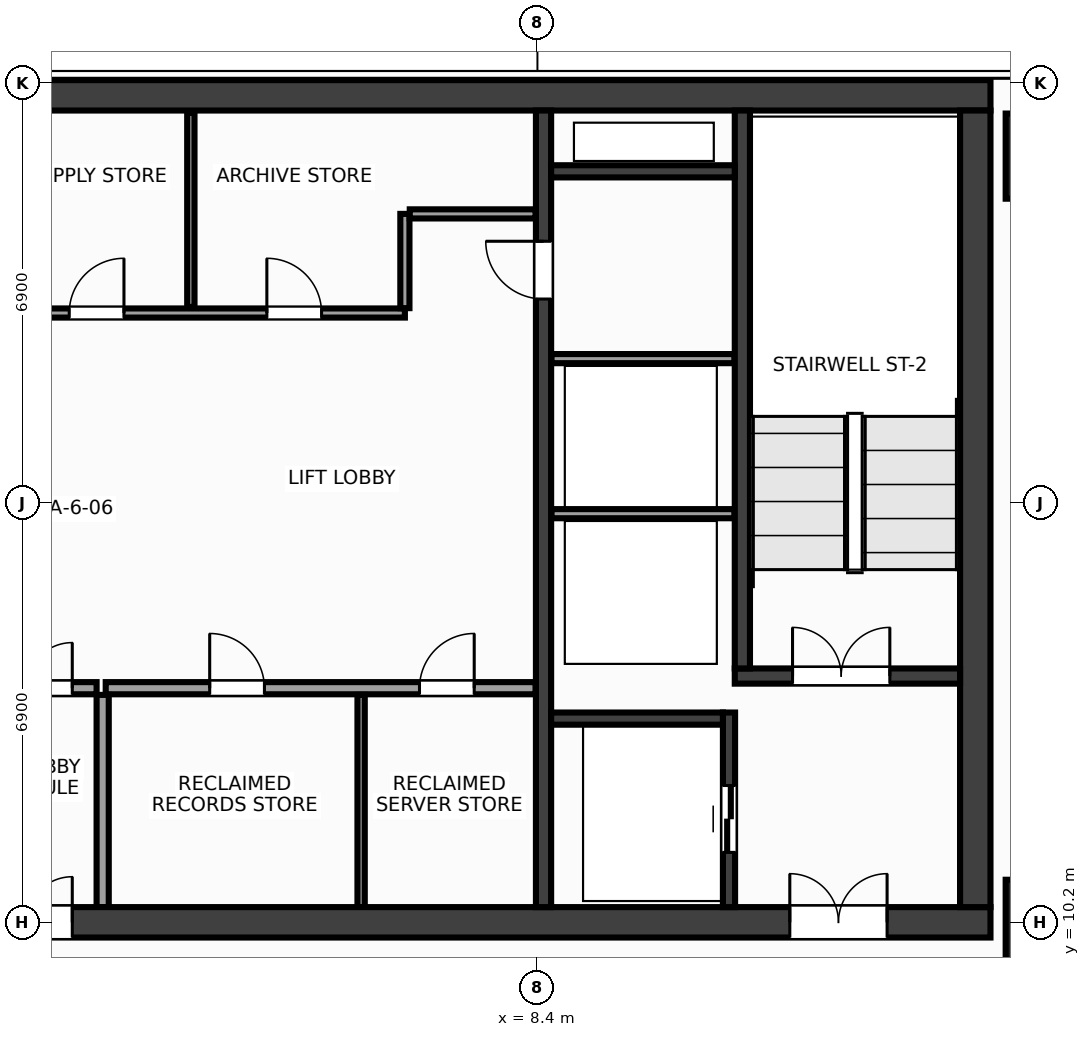
"""IFC4 building model, lengths in metres.
Left out: names, types, materials, properties, quantities, classifications, styles, units other than length and angle.
Written with IfcOpenShell. Run it as: python <this file> out.ifc"""

import sys

from ifc_helpers import new_model, si_unit, direction, frame, frame_2d, origin, origin_2d, place, context, subcontext, project, spatial, rectangle, extrude, source, transform, mapped, element, fill, save


model = new_model("IFC4")
c1 = context("Model", 3, precision=1e-05, world=origin(), true_north=direction((0.0, 1.0)))
c2 = subcontext(c1, "Body", "Model", "MODEL_VIEW")
j1 = project(units=[si_unit("LENGTHUNIT", "METRE"), si_unit("PLANEANGLEUNIT", "RADIAN")], contexts=[c1])
p1 = place(None, origin())
s1 = spatial("IfcSite", under=j1, at=p1, CompositionType="ELEMENT")
p2 = place(p1, origin())
s2 = spatial("IfcBuilding", under=s1, at=p2, CompositionType="ELEMENT")
p3 = place(p2, frame((0.0, 0.0, 254.0)))
s3 = spatial("IfcBuildingStorey", under=s2, at=p3, CompositionType="ELEMENT", Elevation=254.0)
m1 = source(origin(), c2, "Body", "SweptSolid", [
    extrude(rectangle(XDim=31.7, YDim=0.5, at=frame_2d((15.85, 0.0))), origin(), (0.0, 0.0, 1.0), 3.6),
])
p4 = place(p3, frame((-15.85, 23.8, 0.0), z_axis=(0.0, 0.0, 1.0), x_axis=(1.0, 0.0, 0.0)))
e1 = element("IfcWall", 1, at=p4, inside=s3, PredefinedType="SHEAR", context=c2, shape_type="MappedRepresentation", body=[
    mapped(m1, transform((0.0, 0.0, 0.0), x_axis=(1.0, 0.0, 0.0), y_axis=(0.0, 1.0, 0.0), z_axis=(0.0, 0.0, 1.0), scale=1.0)),
])
p5 = place(p3, frame((-15.85, 10.2, 0.0), z_axis=(0.0, 0.0, 1.0), x_axis=(1.0, 0.0, 0.0)))
e2 = element("IfcWall", 2, at=p5, inside=s3, PredefinedType="SHEAR", context=c2, shape_type="MappedRepresentation", body=[
    mapped(m1, transform((0.0, 0.0, 0.0), x_axis=(1.0, 0.0, 0.0), y_axis=(0.0, 1.0, 0.0), z_axis=(0.0, 0.0, 1.0), scale=1.0)),
])
p6 = place(p5, frame((1.7, 0.0, 0.0)))
e3 = element("IfcOpeningElement", 3, at=p6, cuts=e2, PredefinedType="OPENING", context=c2, shape_type="SweptSolid", body=[
    extrude(rectangle(XDim=1.6, YDim=2.15, at=frame_2d((0.8, 1.075))), frame((0.0, 0.262, 0.0), z_axis=(0.0, -1.0, 0.0), x_axis=(1.0, 0.0, 0.0)), (0.0, 0.0, 1.0), 0.524),
])
p7 = place(p5, frame((28.4, 0.0, 0.0)))
e4 = element("IfcOpeningElement", 4, at=p7, cuts=e2, PredefinedType="OPENING", context=c2, shape_type="SweptSolid", body=[
    extrude(rectangle(XDim=1.6, YDim=2.15, at=frame_2d((0.8, 1.075))), frame((0.0, 0.262, 0.0), z_axis=(0.0, -1.0, 0.0), x_axis=(1.0, 0.0, 0.0)), (0.0, 0.0, 1.0), 0.524),
])
p8 = place(p5, frame((15.1, 0.0, 0.0)))
e5 = element("IfcOpeningElement", 5, at=p8, cuts=e2, PredefinedType="OPENING", context=c2, shape_type="SweptSolid", body=[
    extrude(rectangle(XDim=1.5, YDim=2.2, at=frame_2d((0.75, 1.1))), frame((0.0, 0.262, 0.0), z_axis=(0.0, -1.0, 0.0), x_axis=(1.0, 0.0, 0.0)), (0.0, 0.0, 1.0), 0.524),
])
m2 = source(origin(), c2, "Body", "SweptSolid", [
    extrude(rectangle(XDim=13.1, YDim=0.5, at=frame_2d((6.55, 0.0))), origin(), (0.0, 0.0, 1.0), 3.6),
])
p9 = place(p3, frame((15.6, 10.45, 0.0), z_axis=(0.0, 0.0, 1.0), x_axis=(0.0, 1.0, 0.0)))
e6 = element("IfcWall", 6, at=p9, inside=s3, PredefinedType="SHEAR", context=c2, shape_type="MappedRepresentation", body=[
    mapped(m2, transform((0.0, 0.0, 0.0), x_axis=(1.0, 0.0, 0.0), y_axis=(0.0, 1.0, 0.0), z_axis=(0.0, 0.0, 1.0), scale=1.0)),
])
m3 = source(origin(), c2, "Body", "SweptSolid", [
    extrude(rectangle(XDim=13.1, YDim=0.25, at=frame_2d((6.55, 0.0))), origin(), (0.0, 0.0, 1.0), 3.6),
])
p10 = place(p3, frame((8.5, 10.45, 0.0), z_axis=(0.0, 0.0, 1.0), x_axis=(0.0, 1.0, 0.0)))
e7 = element("IfcWall", 7, at=p10, inside=s3, PredefinedType="SHEAR", context=c2, shape_type="MappedRepresentation", body=[
    mapped(m3, transform((0.0, 0.0, 0.0), x_axis=(1.0, 0.0, 0.0), y_axis=(0.0, 1.0, 0.0), z_axis=(0.0, 0.0, 1.0), scale=1.0)),
])
p11 = place(p10, frame((10.0, 0.0, 0.0)))
e8 = element("IfcOpeningElement", 8, at=p11, cuts=e7, PredefinedType="OPENING", context=c2, shape_type="SweptSolid", body=[
    extrude(rectangle(XDim=0.95, YDim=2.15, at=frame_2d((0.475, 1.075))), frame((0.0, 0.137, 0.0), z_axis=(0.0, -1.0, 0.0), x_axis=(1.0, 0.0, 0.0)), (0.0, 0.0, 1.0), 0.274),
])
m4 = source(origin(), c2, "Body", "SweptSolid", [
    extrude(rectangle(XDim=3.705, YDim=0.25, at=frame_2d((1.853, 0.0))), origin(), (0.0, 0.0, 1.0), 3.6),
])
p12 = place(p3, frame((11.645, 14.25, 0.0), z_axis=(0.0, 0.0, 1.0), x_axis=(1.0, 0.0, 0.0)))
e9 = element("IfcWall", 9, at=p12, inside=s3, PredefinedType="SHEAR", context=c2, shape_type="MappedRepresentation", body=[
    mapped(m4, transform((0.0, 0.0, 0.0), x_axis=(1.0, 0.0, 0.0), y_axis=(0.0, 1.0, 0.0), z_axis=(0.0, 0.0, 1.0), scale=1.0)),
])
p13 = place(p12, frame((0.95, 0.0, 0.0)))
e10 = element("IfcOpeningElement", 10, at=p13, cuts=e9, PredefinedType="OPENING", context=c2, shape_type="SweptSolid", body=[
    extrude(rectangle(XDim=1.6, YDim=2.15, at=frame_2d((0.8, 1.075))), frame((0.0, 0.137, 0.0), z_axis=(0.0, -1.0, 0.0), x_axis=(1.0, 0.0, 0.0)), (0.0, 0.0, 1.0), 0.274),
])
m5 = source(origin(), c2, "Body", "SweptSolid", [
    extrude(rectangle(XDim=9.175, YDim=0.25, at=frame_2d((4.587, 0.0))), origin(), (0.0, 0.0, 1.0), 3.6),
])
p14 = place(p3, frame((11.77, 14.375, 0.0), z_axis=(0.0, 0.0, 1.0), x_axis=(0.0, 1.0, 0.0)))
e11 = element("IfcWall", 11, at=p14, inside=s3, PredefinedType="SHEAR", context=c2, shape_type="MappedRepresentation", body=[
    mapped(m5, transform((0.0, 0.0, 0.0), x_axis=(1.0, 0.0, 0.0), y_axis=(0.0, 1.0, 0.0), z_axis=(0.0, 0.0, 1.0), scale=1.0)),
])
m6 = source(origin(), c2, "Body", "SweptSolid", [
    extrude(rectangle(XDim=3.2, YDim=0.2, at=frame_2d((1.6, 0.0))), origin(), (0.0, 0.0, 1.0), 3.6),
])
p15 = place(p3, frame((11.55, 10.45, 0.0), z_axis=(0.0, 0.0, 1.0), x_axis=(0.0, 1.0, 0.0)))
e12 = element("IfcWall", 12, at=p15, inside=s3, PredefinedType="SHEAR", context=c2, shape_type="MappedRepresentation", body=[
    mapped(m6, transform((0.0, 0.0, 0.0), x_axis=(1.0, 0.0, 0.0), y_axis=(0.0, 1.0, 0.0), z_axis=(0.0, 0.0, 1.0), scale=1.0)),
])
p16 = place(p15, frame((0.9, 0.0, 0.0)))
e13 = element("IfcOpeningElement", 13, at=p16, cuts=e12, PredefinedType="OPENING", context=c2, shape_type="SweptSolid", body=[
    extrude(rectangle(XDim=1.1, YDim=2.15, at=frame_2d((0.55, 1.075))), frame((0.0, 0.112, 0.0), z_axis=(0.0, -1.0, 0.0), x_axis=(1.0, 0.0, 0.0)), (0.0, 0.0, 1.0), 0.224),
])
m7 = source(origin(), c2, "Body", "SweptSolid", [
    extrude(rectangle(XDim=2.825, YDim=0.2, at=frame_2d((1.413, 0.0))), origin(), (0.0, 0.0, 1.0), 3.6),
])
p17 = place(p3, frame((8.625, 13.55, 0.0), z_axis=(0.0, 0.0, 1.0), x_axis=(1.0, 0.0, 0.0)))
e14 = element("IfcWall", 14, at=p17, inside=s3, PredefinedType="SHEAR", context=c2, shape_type="MappedRepresentation", body=[
    mapped(m7, transform((0.0, 0.0, 0.0), x_axis=(1.0, 0.0, 0.0), y_axis=(0.0, 1.0, 0.0), z_axis=(0.0, 0.0, 1.0), scale=1.0)),
])
m8 = source(origin(), c2, "Body", "SweptSolid", [
    extrude(rectangle(XDim=3.02, YDim=0.2, at=frame_2d((1.51, 0.0))), origin(), (0.0, 0.0, 1.0), 3.6),
])
p18 = place(p3, frame((8.625, 22.55, 0.0), z_axis=(0.0, 0.0, 1.0), x_axis=(1.0, 0.0, 0.0)))
e15 = element("IfcWall", 15, at=p18, inside=s3, PredefinedType="SHEAR", context=c2, shape_type="MappedRepresentation", body=[
    mapped(m8, transform((0.0, 0.0, 0.0), x_axis=(1.0, 0.0, 0.0), y_axis=(0.0, 1.0, 0.0), z_axis=(0.0, 0.0, 1.0), scale=1.0)),
])
m9 = source(origin(), c2, "Body", "SweptSolid", [
    extrude(rectangle(XDim=1.4, YDim=1.4, at=origin_2d()), origin(), (0.0, 0.0, 1.0), 3.6),
])
for number, where, z_axis, x_axis in (
    (16, (16.8, 10.2, 0.0), (0.0, 0.0, 1.0), (1.0, 0.0, 0.0)),
    (17, (16.8, 22.8, 0.0), (0.0, 0.0, 1.0), (1.0, 0.0, 0.0)),
):
    element("IfcColumn", number, at=place(p3, frame(where, z_axis=z_axis, x_axis=x_axis)), inside=s3, PredefinedType="COLUMN", context=c2, shape_type="MappedRepresentation", body=[
        mapped(m9, transform((0.0, 0.0, 0.0), x_axis=(1.0, 0.0, 0.0), y_axis=(0.0, 1.0, 0.0), z_axis=(0.0, 0.0, 1.0), scale=1.0)),
    ])
m10 = source(origin(), c2, "Body", "SweptSolid", [
    extrude(rectangle(XDim=3.01, YDim=0.15, at=frame_2d((1.505, 0.0))), origin(), (0.0, 0.0, 1.0), 3.37),
])
for number, where, z_axis, x_axis in (
    (18, (8.63, 16.92, 0.0), (0.0, 0.0, 1.0), (1.0, 0.0, 0.0)),
    (19, (8.63, 19.47, 0.0), (0.0, 0.0, 1.0), (1.0, 0.0, 0.0)),
):
    element("IfcWall", number, at=place(p3, frame(where, z_axis=z_axis, x_axis=x_axis)), inside=s3, PredefinedType="PARTITIONING", context=c2, shape_type="MappedRepresentation", body=[
        mapped(m10, transform((0.0, 0.0, 0.0), x_axis=(1.0, 0.0, 0.0), y_axis=(0.0, 1.0, 0.0), z_axis=(0.0, 0.0, 1.0), scale=1.0)),
    ])
m11 = source(origin(), c2, "Body", "SweptSolid", [
    extrude(rectangle(XDim=7.07, YDim=0.2, at=frame_2d((3.535, 0.0))), origin(), (0.0, 0.0, 1.0), 3.37),
])
p19 = place(p3, frame((1.3, 14.05, 0.0), z_axis=(0.0, 0.0, 1.0), x_axis=(1.0, 0.0, 0.0)))
e20 = element("IfcWall", 20, at=p19, inside=s3, PredefinedType="PARTITIONING", context=c2, shape_type="MappedRepresentation", body=[
    mapped(m11, transform((0.0, 0.0, 0.0), x_axis=(1.0, 0.0, 0.0), y_axis=(0.0, 1.0, 0.0), z_axis=(0.0, 0.0, 1.0), scale=1.0)),
])
p20 = place(p19, frame((1.71, 0.0, 0.0)))
e21 = element("IfcOpeningElement", 21, at=p20, cuts=e20, PredefinedType="OPENING", context=c2, shape_type="SweptSolid", body=[
    extrude(rectangle(XDim=0.9, YDim=2.15, at=frame_2d((0.45, 1.075))), frame((0.0, 0.112, 0.0), z_axis=(0.0, -1.0, 0.0), x_axis=(1.0, 0.0, 0.0)), (0.0, 0.0, 1.0), 0.224),
])
p21 = place(p19, frame((5.16, 0.0, 0.0)))
e22 = element("IfcOpeningElement", 22, at=p21, cuts=e20, PredefinedType="OPENING", context=c2, shape_type="SweptSolid", body=[
    extrude(rectangle(XDim=0.9, YDim=2.15, at=frame_2d((0.45, 1.075))), frame((0.0, 0.112, 0.0), z_axis=(0.0, -1.0, 0.0), x_axis=(1.0, 0.0, 0.0)), (0.0, 0.0, 1.0), 0.224),
])
m12 = source(origin(), c2, "Body", "SweptSolid", [
    extrude(rectangle(XDim=3.49, YDim=0.2, at=frame_2d((1.745, 0.0))), origin(), (0.0, 0.0, 1.0), 3.37),
])
p22 = place(p3, frame((1.25, 10.45, 0.0), z_axis=(0.0, 0.0, 1.0), x_axis=(0.0, 1.0, 0.0)))
e23 = element("IfcWall", 23, at=p22, inside=s3, PredefinedType="PARTITIONING", context=c2, shape_type="MappedRepresentation", body=[
    mapped(m12, transform((0.0, 0.0, 0.0), x_axis=(1.0, 0.0, 0.0), y_axis=(0.0, 1.0, 0.0), z_axis=(0.0, 0.0, 1.0), scale=1.0)),
])
m13 = source(origin(), c2, "Body", "SweptSolid", [
    extrude(rectangle(XDim=2.3, YDim=0.2, at=frame_2d((1.15, 0.0))), origin(), (0.0, 0.0, 1.0), 3.37),
])
p23 = place(p3, frame((-1.15, 14.05, 0.0), z_axis=(0.0, 0.0, 1.0), x_axis=(1.0, 0.0, 0.0)))
e24 = element("IfcWall", 24, at=p23, inside=s3, PredefinedType="PARTITIONING", context=c2, shape_type="MappedRepresentation", body=[
    mapped(m13, transform((0.0, 0.0, 0.0), x_axis=(1.0, 0.0, 0.0), y_axis=(0.0, 1.0, 0.0), z_axis=(0.0, 0.0, 1.0), scale=1.0)),
])
p24 = place(p23, frame((0.4, 0.0, 0.0)))
e25 = element("IfcOpeningElement", 25, at=p24, cuts=e24, PredefinedType="OPENING", context=c2, shape_type="SweptSolid", body=[
    extrude(rectangle(XDim=1.5, YDim=2.2, at=frame_2d((0.75, 1.1))), frame((0.0, 0.112, 0.0), z_axis=(0.0, -1.0, 0.0), x_axis=(1.0, 0.0, 0.0)), (0.0, 0.0, 1.0), 0.224),
])
m14 = source(origin(), c2, "Body", "SweptSolid", [
    extrude(rectangle(XDim=14.59, YDim=0.15, at=frame_2d((7.295, 0.0))), origin(), (0.0, 0.0, 1.0), 3.37),
])
p25 = place(p3, frame((-8.37, 20.22, 0.0), z_axis=(0.0, 0.0, 1.0), x_axis=(1.0, 0.0, 0.0)))
e26 = element("IfcWall", 26, at=p25, inside=s3, PredefinedType="PARTITIONING", context=c2, shape_type="MappedRepresentation", body=[
    mapped(m14, transform((0.0, 0.0, 0.0), x_axis=(1.0, 0.0, 0.0), y_axis=(0.0, 1.0, 0.0), z_axis=(0.0, 0.0, 1.0), scale=1.0)),
])
p26 = place(p25, frame((0.86, 0.0, 0.0)))
e27 = element("IfcOpeningElement", 27, at=p26, cuts=e26, PredefinedType="OPENING", context=c2, shape_type="SweptSolid", body=[
    extrude(rectangle(XDim=0.9, YDim=2.15, at=frame_2d((0.45, 1.075))), frame((0.0, 0.087, 0.0), z_axis=(0.0, -1.0, 0.0), x_axis=(1.0, 0.0, 0.0)), (0.0, 0.0, 1.0), 0.174),
])
p27 = place(p25, frame((3.47, 0.0, 0.0)))
e28 = element("IfcOpeningElement", 28, at=p27, cuts=e26, PredefinedType="OPENING", context=c2, shape_type="SweptSolid", body=[
    extrude(rectangle(XDim=0.9, YDim=2.15, at=frame_2d((0.45, 1.075))), frame((0.0, 0.087, 0.0), z_axis=(0.0, -1.0, 0.0), x_axis=(1.0, 0.0, 0.0)), (0.0, 0.0, 1.0), 0.174),
])
p28 = place(p25, frame((6.17, 0.0, 0.0)))
e29 = element("IfcOpeningElement", 29, at=p28, cuts=e26, PredefinedType="OPENING", context=c2, shape_type="SweptSolid", body=[
    extrude(rectangle(XDim=0.9, YDim=2.15, at=frame_2d((0.45, 1.075))), frame((0.0, 0.087, 0.0), z_axis=(0.0, -1.0, 0.0), x_axis=(1.0, 0.0, 0.0)), (0.0, 0.0, 1.0), 0.174),
])
p29 = place(p25, frame((9.07, 0.0, 0.0)))
e30 = element("IfcOpeningElement", 30, at=p29, cuts=e26, PredefinedType="OPENING", context=c2, shape_type="SweptSolid", body=[
    extrude(rectangle(XDim=0.9, YDim=2.15, at=frame_2d((0.45, 1.075))), frame((0.0, 0.087, 0.0), z_axis=(0.0, -1.0, 0.0), x_axis=(1.0, 0.0, 0.0)), (0.0, 0.0, 1.0), 0.174),
])
p30 = place(p25, frame((12.32, 0.0, 0.0)))
e31 = element("IfcOpeningElement", 31, at=p30, cuts=e26, PredefinedType="OPENING", context=c2, shape_type="SweptSolid", body=[
    extrude(rectangle(XDim=0.9, YDim=2.15, at=frame_2d((0.45, 1.075))), frame((0.0, 0.087, 0.0), z_axis=(0.0, -1.0, 0.0), x_axis=(1.0, 0.0, 0.0)), (0.0, 0.0, 1.0), 0.174),
])
m15 = source(origin(), c2, "Body", "SweptSolid", [
    extrude(rectangle(XDim=1.55, YDim=0.15, at=frame_2d((0.775, 0.0))), origin(), (0.0, 0.0, 1.0), 3.37),
])
p31 = place(p3, frame((6.22, 20.3, 0.0), z_axis=(0.0, 0.0, 1.0), x_axis=(0.0, 1.0, 0.0)))
e32 = element("IfcWall", 32, at=p31, inside=s3, PredefinedType="PARTITIONING", context=c2, shape_type="MappedRepresentation", body=[
    mapped(m15, transform((0.0, 0.0, 0.0), x_axis=(1.0, 0.0, 0.0), y_axis=(0.0, 1.0, 0.0), z_axis=(0.0, 0.0, 1.0), scale=1.0)),
])
m16 = source(origin(), c2, "Body", "SweptSolid", [
    extrude(rectangle(XDim=2.07, YDim=0.15, at=frame_2d((1.035, 0.0))), origin(), (0.0, 0.0, 1.0), 3.37),
])
p32 = place(p3, frame((6.3, 21.85, 0.0), z_axis=(0.0, 0.0, 1.0), x_axis=(1.0, 0.0, 0.0)))
e33 = element("IfcWall", 33, at=p32, inside=s3, PredefinedType="PARTITIONING", context=c2, shape_type="MappedRepresentation", body=[
    mapped(m16, transform((0.0, 0.0, 0.0), x_axis=(1.0, 0.0, 0.0), y_axis=(0.0, 1.0, 0.0), z_axis=(0.0, 0.0, 1.0), scale=1.0)),
])
m17 = source(origin(), c2, "Body", "SweptSolid", [
    extrude(rectangle(XDim=3.49, YDim=0.12, at=frame_2d((1.745, 0.0))), origin(), (0.0, 0.0, 1.0), 3.37),
])
p33 = place(p3, frame((5.5, 10.45, 0.0), z_axis=(0.0, 0.0, 1.0), x_axis=(0.0, 1.0, 0.0)))
e34 = element("IfcWall", 34, at=p33, inside=s3, PredefinedType="PARTITIONING", context=c2, shape_type="MappedRepresentation", body=[
    mapped(m17, transform((0.0, 0.0, 0.0), x_axis=(1.0, 0.0, 0.0), y_axis=(0.0, 1.0, 0.0), z_axis=(0.0, 0.0, 1.0), scale=1.0)),
])
m18 = source(origin(), c2, "Body", "SweptSolid", [
    extrude(rectangle(XDim=3.19, YDim=0.12, at=frame_2d((1.595, 0.0))), origin(), (0.0, 0.0, 1.0), 3.37),
])
p34 = place(p3, frame((2.7, 20.32, 0.0), z_axis=(0.0, 0.0, 1.0), x_axis=(0.0, 1.0, 0.0)))
e35 = element("IfcWall", 35, at=p34, inside=s3, PredefinedType="PARTITIONING", context=c2, shape_type="MappedRepresentation", body=[
    mapped(m18, transform((0.0, 0.0, 0.0), x_axis=(1.0, 0.0, 0.0), y_axis=(0.0, 1.0, 0.0), z_axis=(0.0, 0.0, 1.0), scale=1.0)),
])
m19 = source(origin(), c2, "Body", "SweptSolid", [
    extrude(rectangle(XDim=1.6, YDim=2.15, at=frame_2d((0.8, 1.075))), frame((0.0, 0.025, 0.0), z_axis=(0.0, -1.0, 0.0), x_axis=(1.0, 0.0, 0.0)), (0.0, 0.0, 1.0), 0.05),
])
p35 = place(p13, origin())
e36 = element("IfcDoor", 36, at=p35, inside=s3, OperationType="DOUBLE_DOOR_SINGLE_SWING", PredefinedType="DOOR", context=c2, shape_type="MappedRepresentation", body=[
    mapped(m19, transform((0.0, 0.0, 0.0), x_axis=(1.0, 0.0, 0.0), y_axis=(0.0, 1.0, 0.0), z_axis=(0.0, 0.0, 1.0), scale=1.0)),
])
fill(e10, e36)
p36 = place(p7, origin())
e37 = element("IfcDoor", 37, at=p36, inside=s3, OperationType="DOUBLE_DOOR_SINGLE_SWING", PredefinedType="DOOR", context=c2, shape_type="MappedRepresentation", body=[
    mapped(m19, transform((0.0, 0.0, 0.0), x_axis=(1.0, 0.0, 0.0), y_axis=(0.0, 1.0, 0.0), z_axis=(0.0, 0.0, 1.0), scale=1.0)),
])
fill(e4, e37)
m20 = source(origin(), c2, "Body", "SweptSolid", [
    extrude(rectangle(XDim=1.1, YDim=2.15, at=frame_2d((0.55, 1.075))), frame((0.0, 0.025, 0.0), z_axis=(0.0, -1.0, 0.0), x_axis=(1.0, 0.0, 0.0)), (0.0, 0.0, 1.0), 0.05),
])
p37 = place(p16, origin())
e38 = element("IfcDoor", 38, at=p37, inside=s3, OperationType="DOUBLE_DOOR_SLIDING", PredefinedType="DOOR", context=c2, shape_type="MappedRepresentation", body=[
    mapped(m20, transform((0.0, 0.0, 0.0), x_axis=(1.0, 0.0, 0.0), y_axis=(0.0, 1.0, 0.0), z_axis=(0.0, 0.0, 1.0), scale=1.0)),
])
fill(e13, e38)
m21 = source(origin(), c2, "Body", "SweptSolid", [
    extrude(rectangle(XDim=0.95, YDim=2.15, at=frame_2d((0.475, 1.075))), frame((0.0, 0.025, 0.0), z_axis=(0.0, -1.0, 0.0), x_axis=(1.0, 0.0, 0.0)), (0.0, 0.0, 1.0), 0.05),
])
p38 = place(p11, origin())
e39 = element("IfcDoor", 39, at=p38, inside=s3, OperationType="SINGLE_SWING_RIGHT", PredefinedType="DOOR", context=c2, shape_type="MappedRepresentation", body=[
    mapped(m21, transform((0.0, 0.0, 0.0), x_axis=(1.0, 0.0, 0.0), y_axis=(0.0, 1.0, 0.0), z_axis=(0.0, 0.0, 1.0), scale=1.0)),
])
fill(e8, e39)
m22 = source(origin(), c2, "Body", "SweptSolid", [
    extrude(rectangle(XDim=0.9, YDim=2.15, at=frame_2d((0.45, 1.075))), frame((0.0, 0.025, 0.0), z_axis=(0.0, -1.0, 0.0), x_axis=(1.0, 0.0, 0.0)), (0.0, 0.0, 1.0), 0.05),
])
p39 = place(p20, origin())
e40 = element("IfcDoor", 40, at=p39, inside=s3, OperationType="SINGLE_SWING_LEFT", PredefinedType="DOOR", context=c2, shape_type="MappedRepresentation", body=[
    mapped(m22, transform((0.0, 0.0, 0.0), x_axis=(1.0, 0.0, 0.0), y_axis=(0.0, 1.0, 0.0), z_axis=(0.0, 0.0, 1.0), scale=1.0)),
])
fill(e21, e40)
p40 = place(p21, origin())
e41 = element("IfcDoor", 41, at=p40, inside=s3, OperationType="SINGLE_SWING_RIGHT", PredefinedType="DOOR", context=c2, shape_type="MappedRepresentation", body=[
    mapped(m22, transform((0.0, 0.0, 0.0), x_axis=(1.0, 0.0, 0.0), y_axis=(0.0, 1.0, 0.0), z_axis=(0.0, 0.0, 1.0), scale=1.0)),
])
fill(e22, e41)
m23 = source(origin(), c2, "Body", "SweptSolid", [
    extrude(rectangle(XDim=1.5, YDim=2.2, at=frame_2d((0.75, 1.1))), frame((0.0, 0.025, 0.0), z_axis=(0.0, -1.0, 0.0), x_axis=(1.0, 0.0, 0.0)), (0.0, 0.0, 1.0), 0.05),
])
p41 = place(p24, origin())
e42 = element("IfcDoor", 42, at=p41, inside=s3, OperationType="DOUBLE_DOOR_SINGLE_SWING", PredefinedType="DOOR", context=c2, shape_type="MappedRepresentation", body=[
    mapped(m23, transform((0.0, 0.0, 0.0), x_axis=(1.0, 0.0, 0.0), y_axis=(0.0, 1.0, 0.0), z_axis=(0.0, 0.0, 1.0), scale=1.0)),
])
fill(e25, e42)
p42 = place(p8, origin())
e43 = element("IfcDoor", 43, at=p42, inside=s3, OperationType="DOUBLE_DOOR_SINGLE_SWING", PredefinedType="DOOR", context=c2, shape_type="MappedRepresentation", body=[
    mapped(m23, transform((0.0, 0.0, 0.0), x_axis=(1.0, 0.0, 0.0), y_axis=(0.0, 1.0, 0.0), z_axis=(0.0, 0.0, 1.0), scale=1.0)),
])
fill(e5, e43)
p43 = place(p29, origin())
e44 = element("IfcDoor", 44, at=p43, inside=s3, OperationType="SINGLE_SWING_RIGHT", PredefinedType="DOOR", context=c2, shape_type="MappedRepresentation", body=[
    mapped(m22, transform((0.0, 0.0, 0.0), x_axis=(1.0, 0.0, 0.0), y_axis=(0.0, 1.0, 0.0), z_axis=(0.0, 0.0, 1.0), scale=1.0)),
])
fill(e30, e44)
p44 = place(p30, origin())
e45 = element("IfcDoor", 45, at=p44, inside=s3, OperationType="SINGLE_SWING_LEFT", PredefinedType="DOOR", context=c2, shape_type="MappedRepresentation", body=[
    mapped(m22, transform((0.0, 0.0, 0.0), x_axis=(1.0, 0.0, 0.0), y_axis=(0.0, 1.0, 0.0), z_axis=(0.0, 0.0, 1.0), scale=1.0)),
])
fill(e31, e45)
save(model, sys.argv[1])
